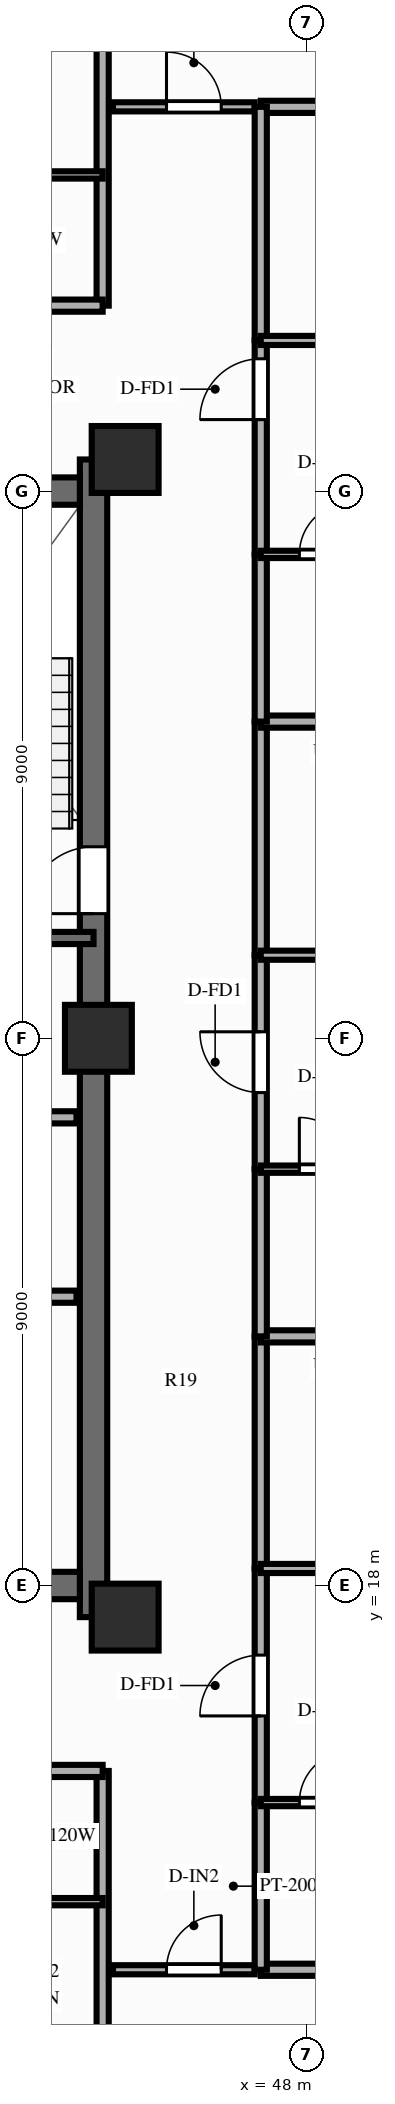
"""IFC4 building model, lengths in metres.
Left out: names, types, materials, properties, quantities, classifications, styles, units other than length and angle.
Written with IfcOpenShell. Run it as: python <this file> out.ifc"""

import sys

from ifc_helpers import new_model, si_unit, direction, frame, frame_2d, origin, origin_2d, place, context, subcontext, project, spatial, rectangle, extrude, source, transform, mapped, element, fill, save


model = new_model("IFC4")
c1 = context("Model", 3, precision=1e-05, world=origin(), true_north=direction((0.0, 1.0)))
c2 = subcontext(c1, "Body", "Model", "MODEL_VIEW")
j1 = project(units=[si_unit("LENGTHUNIT", "METRE"), si_unit("PLANEANGLEUNIT", "RADIAN")], contexts=[c1])
p1 = place(None, origin())
s1 = spatial("IfcSite", under=j1, at=p1, CompositionType="ELEMENT")
p2 = place(p1, origin())
s2 = spatial("IfcBuilding", under=s1, at=p2, CompositionType="ELEMENT")
p3 = place(p2, frame((0.0, 0.0, 202.6)))
s3 = spatial("IfcBuildingStorey", under=s2, at=p3, CompositionType="ELEMENT", Elevation=202.6)
p4 = place(p3, frame((44.5, 17.48, 0.0), z_axis=(0.0, 0.0, 1.0), x_axis=(0.0, 1.0, 0.0)))
e1 = element("IfcWall", 1, at=p4, inside=s3, PredefinedType="SHEAR", context=c2, shape_type="SweptSolid", body=[
    extrude(rectangle(XDim=19.04, YDim=0.45, at=frame_2d((9.52, 0.0))), origin(), (0.0, 0.0, 1.0), 3.9),
])
p5 = place(p4, frame((12.67, 0.0, 0.0), z_axis=(0.0, 0.0, 1.0), x_axis=(-1.0, 0.0, 0.0)))
e2 = element("IfcOpeningElement", 2, at=p5, cuts=e1, PredefinedType="OPENING", context=c2, shape_type="SweptSolid", body=[
    extrude(rectangle(XDim=1.1, YDim=2.15, at=frame_2d((0.55, 1.075))), frame((0.0, 0.237, 0.0), z_axis=(0.0, -1.0, 0.0), x_axis=(1.0, 0.0, 0.0)), (0.0, 0.0, 1.0), 0.474),
])
p6 = place(p3, frame((31.725, 18.0, 0.0), z_axis=(0.0, 0.0, 1.0), x_axis=(1.0, 0.0, 0.0)))
e3 = element("IfcWall", 3, at=p6, inside=s3, PredefinedType="SHEAR", context=c2, shape_type="SweptSolid", body=[
    extrude(rectangle(XDim=12.55, YDim=0.45, at=frame_2d((6.275, 0.0))), origin(), (0.0, 0.0, 1.0), 3.9),
])
p7 = place(p3, frame((31.725, 36.0, 0.0), z_axis=(0.0, 0.0, 1.0), x_axis=(1.0, 0.0, 0.0)))
e4 = element("IfcWall", 4, at=p7, inside=s3, PredefinedType="SHEAR", context=c2, shape_type="SweptSolid", body=[
    extrude(rectangle(XDim=12.55, YDim=0.45, at=frame_2d((6.275, 0.0))), origin(), (0.0, 0.0, 1.0), 3.9),
])
p8 = place(p7, frame((5.225, 0.0, 0.0), z_axis=(0.0, 0.0, 1.0), x_axis=(-1.0, 0.0, 0.0)))
e5 = element("IfcOpeningElement", 5, at=p8, cuts=e4, PredefinedType="OPENING", context=c2, shape_type="SweptSolid", body=[
    extrude(rectangle(XDim=1.4, YDim=2.15, at=frame_2d((0.7, 1.075))), frame((0.0, 0.237, 0.0), z_axis=(0.0, -1.0, 0.0), x_axis=(1.0, 0.0, 0.0)), (0.0, 0.0, 1.0), 0.474),
])
m1 = source(origin(), c2, "Body", "SweptSolid", [
    extrude(rectangle(XDim=1.1, YDim=1.1, at=origin_2d()), origin(), (0.0, 0.0, 1.0), 3.9),
])
for number, where, z_axis, x_axis in (
    (6, (45.02, 17.48, 0.0), (0.0, 0.0, 1.0), (1.0, 0.0, 0.0)),
    (7, (45.02, 36.52, 0.0), (0.0, 0.0, 1.0), (1.0, 0.0, 0.0)),
    (8, (44.58, 27.0, 0.0), (0.0, 0.0, 1.0), (1.0, 0.0, 0.0)),
):
    element("IfcColumn", number, at=place(p3, frame(where, z_axis=z_axis, x_axis=x_axis)), inside=s3, PredefinedType="COLUMN", context=c2, shape_type="MappedRepresentation", body=[
        mapped(m1, transform((0.0, 0.0, 0.0), scale=1.0)),
    ])
p9 = place(p3, frame((41.55, 22.75, 0.0), z_axis=(0.0, 0.0, 1.0), x_axis=(1.0, 0.0, 0.0)))
e9 = element("IfcWall", 9, at=p9, inside=s3, PredefinedType="PARTITIONING", context=c2, shape_type="SweptSolid", body=[
    extrude(rectangle(XDim=2.67, YDim=0.2, at=frame_2d((1.335, 0.0))), origin(), (0.0, 0.0, 1.0), 3.6),
])
p10 = place(p3, frame((41.55, 25.7, 0.0), z_axis=(0.0, 0.0, 1.0), x_axis=(1.0, 0.0, 0.0)))
e10 = element("IfcWall", 10, at=p10, inside=s3, PredefinedType="PARTITIONING", context=c2, shape_type="SweptSolid", body=[
    extrude(rectangle(XDim=2.67, YDim=0.2, at=frame_2d((1.335, 0.0))), origin(), (0.0, 0.0, 1.0), 3.04),
])
p11 = place(p3, frame((40.57, 28.65, 0.0), z_axis=(0.0, 0.0, 1.0), x_axis=(1.0, 0.0, 0.0)))
e11 = element("IfcWall", 11, at=p11, inside=s3, PredefinedType="SOLIDWALL", context=c2, shape_type="SweptSolid", body=[
    extrude(rectangle(XDim=3.93, YDim=0.2, at=frame_2d((1.965, 0.0))), origin(), (0.0, 0.0, 1.0), 3.6),
])
p12 = place(p3, frame((44.82, 11.68, 0.0), z_axis=(0.0, 0.0, 1.0), x_axis=(1.0, 0.0, 0.0)))
e12 = element("IfcWall", 12, at=p12, inside=s3, PredefinedType="PARTITIONING", context=c2, shape_type="SweptSolid", body=[
    extrude(rectangle(XDim=2.33, YDim=0.15, at=frame_2d((1.165, 0.0))), origin(), (0.0, 0.0, 1.0), 3.6),
])
p13 = place(p12, frame((0.88, 0.0, 0.0)))
e13 = element("IfcOpeningElement", 13, at=p13, cuts=e12, PredefinedType="OPENING", context=c2, shape_type="SweptSolid", body=[
    extrude(rectangle(XDim=0.9, YDim=2.1, at=frame_2d((0.45, 1.05))), frame((0.0, 0.087, 0.0), z_axis=(0.0, -1.0, 0.0), x_axis=(1.0, 0.0, 0.0)), (0.0, 0.0, 1.0), 0.174),
])
p14 = place(p3, frame((44.82, 42.32, 0.0), z_axis=(0.0, 0.0, 1.0), x_axis=(1.0, 0.0, 0.0)))
e14 = element("IfcWall", 14, at=p14, inside=s3, PredefinedType="PARTITIONING", context=c2, shape_type="SweptSolid", body=[
    extrude(rectangle(XDim=2.33, YDim=0.15, at=frame_2d((1.165, 0.0))), origin(), (0.0, 0.0, 1.0), 3.6),
])
p15 = place(p14, frame((0.88, 0.0, 0.0)))
e15 = element("IfcOpeningElement", 15, at=p15, cuts=e14, PredefinedType="OPENING", context=c2, shape_type="SweptSolid", body=[
    extrude(rectangle(XDim=0.9, YDim=2.1, at=frame_2d((0.45, 1.05))), frame((0.0, 0.087, 0.0), z_axis=(0.0, -1.0, 0.0), x_axis=(1.0, 0.0, 0.0)), (0.0, 0.0, 1.0), 0.174),
])
p16 = place(p3, frame((44.65, 14.95, 0.0), z_axis=(0.0, 0.0, 1.0), x_axis=(0.0, -1.0, 0.0)))
e16 = element("IfcWall", 16, at=p16, inside=s3, PredefinedType="PARTITIONING", context=c2, shape_type="SweptSolid", body=[
    extrude(rectangle(XDim=8.8, YDim=0.2, at=frame_2d((4.4, 0.0))), origin(), (0.0, 0.0, 1.0), 2.79),
])
p17 = place(p3, frame((41.8, 14.95, 0.0), z_axis=(0.0, 0.0, 1.0), x_axis=(1.0, 0.0, 0.0)))
e17 = element("IfcWall", 17, at=p17, inside=s3, PredefinedType="PARTITIONING", context=c2, shape_type="SweptSolid", body=[
    extrude(rectangle(XDim=2.85, YDim=0.2, at=frame_2d((1.425, 0.0))), origin(), (0.0, 0.0, 1.0), 3.6),
])
p18 = place(p3, frame((41.8, 12.8, 0.0), z_axis=(0.0, 0.0, 1.0), x_axis=(1.0, 0.0, 0.0)))
e18 = element("IfcWall", 18, at=p18, inside=s3, PredefinedType="PARTITIONING", context=c2, shape_type="SweptSolid", body=[
    extrude(rectangle(XDim=2.85, YDim=0.12, at=frame_2d((1.425, 0.0))), origin(), (0.0, 0.0, 1.0), 3.6),
])
p19 = place(p3, frame((44.65, 39.05, 0.0), z_axis=(0.0, 0.0, 1.0), x_axis=(0.0, 1.0, 0.0)))
e19 = element("IfcWall", 19, at=p19, inside=s3, PredefinedType="PARTITIONING", context=c2, shape_type="SweptSolid", body=[
    extrude(rectangle(XDim=8.8, YDim=0.2, at=frame_2d((4.4, 0.0))), origin(), (0.0, 0.0, 1.0), 2.79),
])
p20 = place(p3, frame((42.085, 39.05, 0.0), z_axis=(0.0, 0.0, 1.0), x_axis=(1.0, 0.0, 0.0)))
e20 = element("IfcWall", 20, at=p20, inside=s3, PredefinedType="PARTITIONING", context=c2, shape_type="SweptSolid", body=[
    extrude(rectangle(XDim=2.564, YDim=0.2, at=frame_2d((1.282, 0.0))), origin(), (0.0, 0.0, 1.0), 3.6),
])
p21 = place(p3, frame((42.085, 41.2, 0.0), z_axis=(0.0, 0.0, 1.0), x_axis=(1.0, 0.0, 0.0)))
e21 = element("IfcWall", 21, at=p21, inside=s3, PredefinedType="PARTITIONING", context=c2, shape_type="SweptSolid", body=[
    extrude(rectangle(XDim=2.564, YDim=0.12, at=frame_2d((1.282, 0.0))), origin(), (0.0, 0.0, 1.0), 3.6),
])
for number, where, z_axis, x_axis in (
    (22, (47.25, 11.68, 0.0), (0.0, 0.0, 1.0), (1.0, 0.0, 0.0)),
    (23, (47.25, 42.32, 0.0), (0.0, 0.0, 1.0), (1.0, 0.0, 0.0)),
):
    element("IfcWall", number, at=place(p3, frame(where, z_axis=z_axis, x_axis=x_axis)), inside=s3, PredefinedType="PARTITIONING", context=c2, shape_type="SweptSolid", body=[
        extrude(rectangle(XDim=9.1, YDim=0.2, at=frame_2d((4.55, 0.0))), origin(), (0.0, 0.0, 1.0), 3.6),
    ])
p22 = place(p3, frame((47.25, 11.68, 0.0), z_axis=(0.0, 0.0, 1.0), x_axis=(0.0, 1.0, 0.0)))
e24 = element("IfcWall", 24, at=p22, inside=s3, PredefinedType="PARTITIONING", context=c2, shape_type="SweptSolid", body=[
    extrude(rectangle(XDim=2.75, YDim=0.2, at=frame_2d((1.375, 0.0))), origin(), (0.0, 0.0, 1.0), 3.6),
])
p23 = place(p3, frame((47.25, 14.43, 0.0), z_axis=(0.0, 0.0, 1.0), x_axis=(0.0, 1.0, 0.0)))
e25 = element("IfcWall", 25, at=p23, inside=s3, PredefinedType="PARTITIONING", context=c2, shape_type="SweptSolid", body=[
    extrude(rectangle(XDim=3.85, YDim=0.2, at=frame_2d((1.925, 0.0))), origin(), (0.0, 0.0, 1.0), 3.6),
])
p24 = place(p23, frame((1.425, 0.0, 0.0)))
e26 = element("IfcOpeningElement", 26, at=p24, cuts=e25, PredefinedType="OPENING", context=c2, shape_type="SweptSolid", body=[
    extrude(rectangle(XDim=1.0, YDim=2.15, at=frame_2d((0.5, 1.075))), frame((0.0, 0.112, 0.0), z_axis=(0.0, -1.0, 0.0), x_axis=(1.0, 0.0, 0.0)), (0.0, 0.0, 1.0), 0.224),
])
p25 = place(p3, frame((47.25, 18.28, 0.0), z_axis=(0.0, 0.0, 1.0), x_axis=(0.0, 1.0, 0.0)))
e27 = element("IfcWall", 27, at=p25, inside=s3, PredefinedType="PARTITIONING", context=c2, shape_type="SweptSolid", body=[
    extrude(rectangle(XDim=3.818, YDim=0.2, at=frame_2d((1.909, 0.0))), origin(), (0.0, 0.0, 1.0), 3.6),
])
p26 = place(p3, frame((47.25, 14.43, 0.0), z_axis=(0.0, 0.0, 1.0), x_axis=(1.0, 0.0, 0.0)))
e28 = element("IfcWall", 28, at=p26, inside=s3, PredefinedType="PARTITIONING", context=c2, shape_type="SweptSolid", body=[
    extrude(rectangle(XDim=2.12, YDim=0.12, at=frame_2d((1.06, 0.0))), origin(), (0.0, 0.0, 1.0), 3.6),
])
p27 = place(p26, frame((0.635, 0.0, 0.0)))
e29 = element("IfcOpeningElement", 29, at=p27, cuts=e28, PredefinedType="OPENING", context=c2, shape_type="SweptSolid", body=[
    extrude(rectangle(XDim=0.85, YDim=2.05, at=frame_2d((0.425, 1.025))), frame((0.0, 0.072, 0.0), z_axis=(0.0, -1.0, 0.0), x_axis=(1.0, 0.0, 0.0)), (0.0, 0.0, 1.0), 0.144),
])
p28 = place(p3, frame((47.25, 18.28, 0.0), z_axis=(0.0, 0.0, 1.0), x_axis=(1.0, 0.0, 0.0)))
e30 = element("IfcWall", 30, at=p28, inside=s3, PredefinedType="PARTITIONING", context=c2, shape_type="SweptSolid", body=[
    extrude(rectangle(XDim=3.08, YDim=0.15, at=frame_2d((1.54, 0.0))), origin(), (0.0, 0.0, 1.0), 3.6),
])
p29 = place(p28, frame((1.09, 0.0, 0.0)))
e31 = element("IfcOpeningElement", 31, at=p29, cuts=e30, PredefinedType="OPENING", context=c2, shape_type="SweptSolid", body=[
    extrude(rectangle(XDim=0.9, YDim=2.1, at=frame_2d((0.45, 1.05))), frame((0.0, 0.087, 0.0), z_axis=(0.0, -1.0, 0.0), x_axis=(1.0, 0.0, 0.0)), (0.0, 0.0, 1.0), 0.174),
])
p30 = place(p3, frame((47.25, 22.098, 0.0), z_axis=(0.0, 0.0, 1.0), x_axis=(1.0, 0.0, 0.0)))
e32 = element("IfcWall", 32, at=p30, inside=s3, PredefinedType="PARTITIONING", context=c2, shape_type="SweptSolid", body=[
    extrude(rectangle(XDim=9.1, YDim=0.2, at=frame_2d((4.55, 0.0))), origin(), (0.0, 0.0, 1.0), 3.29),
])
p31 = place(p3, frame((47.25, 22.098, 0.0), z_axis=(0.0, 0.0, 1.0), x_axis=(0.0, 1.0, 0.0)))
e33 = element("IfcWall", 33, at=p31, inside=s3, PredefinedType="PARTITIONING", context=c2, shape_type="SweptSolid", body=[
    extrude(rectangle(XDim=2.75, YDim=0.2, at=frame_2d((1.375, 0.0))), origin(), (0.0, 0.0, 1.0), 3.6),
])
p32 = place(p3, frame((47.25, 24.848, 0.0), z_axis=(0.0, 0.0, 1.0), x_axis=(0.0, 1.0, 0.0)))
e34 = element("IfcWall", 34, at=p32, inside=s3, PredefinedType="PARTITIONING", context=c2, shape_type="SweptSolid", body=[
    extrude(rectangle(XDim=3.519, YDim=0.2, at=frame_2d((1.759, 0.0))), origin(), (0.0, 0.0, 1.0), 3.6),
])
p33 = place(p32, frame((1.26, 0.0, 0.0)))
e35 = element("IfcOpeningElement", 35, at=p33, cuts=e34, PredefinedType="OPENING", context=c2, shape_type="SweptSolid", body=[
    extrude(rectangle(XDim=1.0, YDim=2.15, at=frame_2d((0.5, 1.075))), frame((0.0, 0.112, 0.0), z_axis=(0.0, -1.0, 0.0), x_axis=(1.0, 0.0, 0.0)), (0.0, 0.0, 1.0), 0.224),
])
p34 = place(p3, frame((47.25, 28.366, 0.0), z_axis=(0.0, 0.0, 1.0), x_axis=(0.0, 1.0, 0.0)))
e36 = element("IfcWall", 36, at=p34, inside=s3, PredefinedType="PARTITIONING", context=c2, shape_type="SweptSolid", body=[
    extrude(rectangle(XDim=3.842, YDim=0.2, at=frame_2d((1.921, 0.0))), origin(), (0.0, 0.0, 1.0), 3.6),
])
p35 = place(p3, frame((47.25, 24.848, 0.0), z_axis=(0.0, 0.0, 1.0), x_axis=(1.0, 0.0, 0.0)))
e37 = element("IfcWall", 37, at=p35, inside=s3, PredefinedType="PARTITIONING", context=c2, shape_type="SweptSolid", body=[
    extrude(rectangle(XDim=2.12, YDim=0.12, at=frame_2d((1.06, 0.0))), origin(), (0.0, 0.0, 1.0), 3.6),
])
p36 = place(p35, frame((0.635, 0.0, 0.0)))
e38 = element("IfcOpeningElement", 38, at=p36, cuts=e37, PredefinedType="OPENING", context=c2, shape_type="SweptSolid", body=[
    extrude(rectangle(XDim=0.85, YDim=2.05, at=frame_2d((0.425, 1.025))), frame((0.0, 0.072, 0.0), z_axis=(0.0, -1.0, 0.0), x_axis=(1.0, 0.0, 0.0)), (0.0, 0.0, 1.0), 0.144),
])
p37 = place(p3, frame((47.25, 28.366, 0.0), z_axis=(0.0, 0.0, 1.0), x_axis=(1.0, 0.0, 0.0)))
e39 = element("IfcWall", 39, at=p37, inside=s3, PredefinedType="PARTITIONING", context=c2, shape_type="SweptSolid", body=[
    extrude(rectangle(XDim=3.08, YDim=0.15, at=frame_2d((1.54, 0.0))), origin(), (0.0, 0.0, 1.0), 3.6),
])
p38 = place(p37, frame((1.09, 0.0, 0.0)))
e40 = element("IfcOpeningElement", 40, at=p38, cuts=e39, PredefinedType="OPENING", context=c2, shape_type="SweptSolid", body=[
    extrude(rectangle(XDim=0.9, YDim=2.1, at=frame_2d((0.45, 1.05))), frame((0.0, 0.087, 0.0), z_axis=(0.0, -1.0, 0.0), x_axis=(1.0, 0.0, 0.0)), (0.0, 0.0, 1.0), 0.174),
])
p39 = place(p3, frame((47.25, 32.209, 0.0), z_axis=(0.0, 0.0, 1.0), x_axis=(1.0, 0.0, 0.0)))
e41 = element("IfcWall", 41, at=p39, inside=s3, PredefinedType="PARTITIONING", context=c2, shape_type="SweptSolid", body=[
    extrude(rectangle(XDim=9.1, YDim=0.2, at=frame_2d((4.55, 0.0))), origin(), (0.0, 0.0, 1.0), 3.29),
])
p40 = place(p3, frame((47.25, 32.209, 0.0), z_axis=(0.0, 0.0, 1.0), x_axis=(0.0, 1.0, 0.0)))
e42 = element("IfcWall", 42, at=p40, inside=s3, PredefinedType="PARTITIONING", context=c2, shape_type="SweptSolid", body=[
    extrude(rectangle(XDim=2.75, YDim=0.2, at=frame_2d((1.375, 0.0))), origin(), (0.0, 0.0, 1.0), 3.6),
])
p41 = place(p3, frame((47.25, 34.959, 0.0), z_axis=(0.0, 0.0, 1.0), x_axis=(0.0, 1.0, 0.0)))
e43 = element("IfcWall", 43, at=p41, inside=s3, PredefinedType="PARTITIONING", context=c2, shape_type="SweptSolid", body=[
    extrude(rectangle(XDim=3.519, YDim=0.2, at=frame_2d((1.76, 0.0))), origin(), (0.0, 0.0, 1.0), 3.6),
])
p42 = place(p41, frame((2.217, 0.0, 0.0)))
e44 = element("IfcOpeningElement", 44, at=p42, cuts=e43, PredefinedType="OPENING", context=c2, shape_type="SweptSolid", body=[
    extrude(rectangle(XDim=1.0, YDim=2.15, at=frame_2d((0.5, 1.075))), frame((0.0, 0.112, 0.0), z_axis=(0.0, -1.0, 0.0), x_axis=(1.0, 0.0, 0.0)), (0.0, 0.0, 1.0), 0.224),
])
p43 = place(p3, frame((47.25, 38.478, 0.0), z_axis=(0.0, 0.0, 1.0), x_axis=(0.0, 1.0, 0.0)))
e45 = element("IfcWall", 45, at=p43, inside=s3, PredefinedType="PARTITIONING", context=c2, shape_type="SweptSolid", body=[
    extrude(rectangle(XDim=3.842, YDim=0.2, at=frame_2d((1.921, 0.0))), origin(), (0.0, 0.0, 1.0), 3.6),
])
p44 = place(p3, frame((47.25, 34.959, 0.0), z_axis=(0.0, 0.0, 1.0), x_axis=(1.0, 0.0, 0.0)))
e46 = element("IfcWall", 46, at=p44, inside=s3, PredefinedType="PARTITIONING", context=c2, shape_type="SweptSolid", body=[
    extrude(rectangle(XDim=2.12, YDim=0.12, at=frame_2d((1.06, 0.0))), origin(), (0.0, 0.0, 1.0), 3.6),
])
p45 = place(p44, frame((0.635, 0.0, 0.0)))
e47 = element("IfcOpeningElement", 47, at=p45, cuts=e46, PredefinedType="OPENING", context=c2, shape_type="SweptSolid", body=[
    extrude(rectangle(XDim=0.85, YDim=2.05, at=frame_2d((0.425, 1.025))), frame((0.0, 0.072, 0.0), z_axis=(0.0, -1.0, 0.0), x_axis=(1.0, 0.0, 0.0)), (0.0, 0.0, 1.0), 0.144),
])
p46 = place(p3, frame((47.25, 38.478, 0.0), z_axis=(0.0, 0.0, 1.0), x_axis=(1.0, 0.0, 0.0)))
e48 = element("IfcWall", 48, at=p46, inside=s3, PredefinedType="PARTITIONING", context=c2, shape_type="SweptSolid", body=[
    extrude(rectangle(XDim=3.08, YDim=0.15, at=frame_2d((1.54, 0.0))), origin(), (0.0, 0.0, 1.0), 3.6),
])
p47 = place(p46, frame((1.09, 0.0, 0.0)))
e49 = element("IfcOpeningElement", 49, at=p47, cuts=e48, PredefinedType="OPENING", context=c2, shape_type="SweptSolid", body=[
    extrude(rectangle(XDim=0.9, YDim=2.1, at=frame_2d((0.45, 1.05))), frame((0.0, 0.087, 0.0), z_axis=(0.0, -1.0, 0.0), x_axis=(1.0, 0.0, 0.0)), (0.0, 0.0, 1.0), 0.174),
])
m2 = source(origin(), c2, "Body", "SweptSolid", [
    extrude(rectangle(XDim=1.1, YDim=2.15, at=frame_2d((0.55, 1.075))), frame((0.0, 0.025, 0.0), z_axis=(0.0, -1.0, 0.0), x_axis=(1.0, 0.0, 0.0)), (0.0, 0.0, 1.0), 0.05),
])
p48 = place(p5, origin())
e50 = element("IfcDoor", 50, at=p48, inside=s3, OperationType="SINGLE_SWING_RIGHT", PredefinedType="DOOR", context=c2, shape_type="MappedRepresentation", body=[
    mapped(m2, transform((0.0, 0.0, 0.0), scale=1.0)),
])
fill(e2, e50)
m3 = source(origin(), c2, "Body", "SweptSolid", [
    extrude(rectangle(XDim=0.9, YDim=2.1, at=frame_2d((0.45, 1.05))), frame((0.0, 0.025, 0.0), z_axis=(0.0, -1.0, 0.0), x_axis=(1.0, 0.0, 0.0)), (0.0, 0.0, 1.0), 0.05),
])
p49 = place(p13, origin())
e51 = element("IfcDoor", 51, at=p49, inside=s3, OperationType="SINGLE_SWING_RIGHT", PredefinedType="DOOR", context=c2, shape_type="MappedRepresentation", body=[
    mapped(m3, transform((0.0, 0.0, 0.0), scale=1.0)),
])
fill(e13, e51)
p50 = place(p15, origin())
e52 = element("IfcDoor", 52, at=p50, inside=s3, OperationType="SINGLE_SWING_LEFT", PredefinedType="DOOR", context=c2, shape_type="MappedRepresentation", body=[
    mapped(m3, transform((0.0, 0.0, 0.0), scale=1.0)),
])
fill(e15, e52)
m4 = source(origin(), c2, "Body", "SweptSolid", [
    extrude(rectangle(XDim=1.0, YDim=2.15, at=frame_2d((0.5, 1.075))), frame((0.0, 0.025, 0.0), z_axis=(0.0, -1.0, 0.0), x_axis=(1.0, 0.0, 0.0)), (0.0, 0.0, 1.0), 0.05),
])
p51 = place(p24, origin())
e53 = element("IfcDoor", 53, at=p51, inside=s3, OperationType="SINGLE_SWING_LEFT", PredefinedType="DOOR", context=c2, shape_type="MappedRepresentation", body=[
    mapped(m4, transform((0.0, 0.0, 0.0), scale=1.0)),
])
fill(e26, e53)
m5 = source(origin(), c2, "Body", "SweptSolid", [
    extrude(rectangle(XDim=0.85, YDim=2.05, at=frame_2d((0.425, 1.025))), frame((0.0, 0.025, 0.0), z_axis=(0.0, -1.0, 0.0), x_axis=(1.0, 0.0, 0.0)), (0.0, 0.0, 1.0), 0.05),
])
p52 = place(p27, origin())
e54 = element("IfcDoor", 54, at=p52, inside=s3, OperationType="SINGLE_SWING_RIGHT", PredefinedType="DOOR", context=c2, shape_type="MappedRepresentation", body=[
    mapped(m5, transform((0.0, 0.0, 0.0), scale=1.0)),
])
fill(e29, e54)
p53 = place(p33, origin())
e55 = element("IfcDoor", 55, at=p53, inside=s3, OperationType="SINGLE_SWING_RIGHT", PredefinedType="DOOR", context=c2, shape_type="MappedRepresentation", body=[
    mapped(m4, transform((0.0, 0.0, 0.0), scale=1.0)),
])
fill(e35, e55)
p54 = place(p36, origin())
e56 = element("IfcDoor", 56, at=p54, inside=s3, OperationType="SINGLE_SWING_LEFT", PredefinedType="DOOR", context=c2, shape_type="MappedRepresentation", body=[
    mapped(m5, transform((0.0, 0.0, 0.0), scale=1.0)),
])
fill(e38, e56)
p55 = place(p42, origin())
e57 = element("IfcDoor", 57, at=p55, inside=s3, OperationType="SINGLE_SWING_LEFT", PredefinedType="DOOR", context=c2, shape_type="MappedRepresentation", body=[
    mapped(m4, transform((0.0, 0.0, 0.0), scale=1.0)),
])
fill(e44, e57)
p56 = place(p45, origin())
e58 = element("IfcDoor", 58, at=p56, inside=s3, OperationType="SINGLE_SWING_RIGHT", PredefinedType="DOOR", context=c2, shape_type="MappedRepresentation", body=[
    mapped(m5, transform((0.0, 0.0, 0.0), scale=1.0)),
])
fill(e47, e58)
save(model, sys.argv[1])
